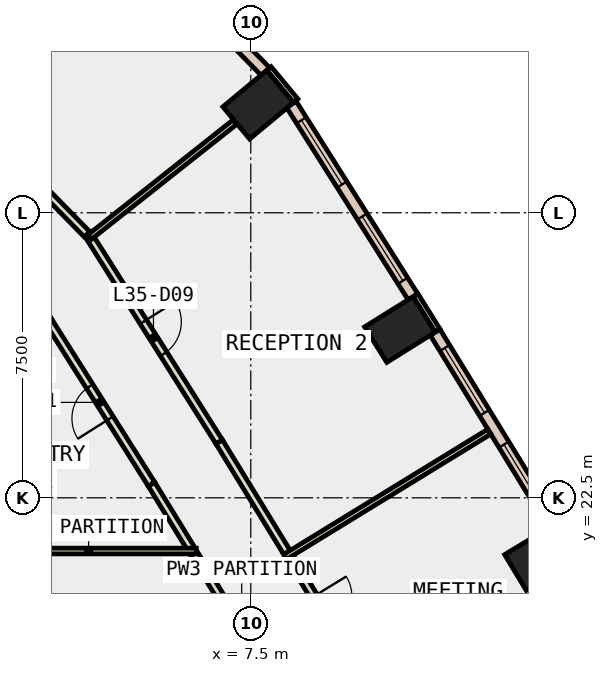
"""IFC4 building model, lengths in metres.
Left out: names, types, materials, properties, quantities, classifications, styles, units other than length and angle.
Written with IfcOpenShell. Run it as: python <this file> out.ifc"""

import sys

from ifc_helpers import new_model, si_unit, direction, frame, frame_2d, origin, origin_2d, place, context, subcontext, project, spatial, rectangle, extrude, element, fill, save


model = new_model("IFC4")
c1 = context("Model", 3, precision=1e-05, world=origin(), true_north=direction((0.0, 1.0)))
c2 = subcontext(c1, "Body", "Model", "MODEL_VIEW")
j1 = project(units=[si_unit("LENGTHUNIT", "METRE"), si_unit("PLANEANGLEUNIT", "RADIAN")], contexts=[c1])
p1 = place(None, origin())
s1 = spatial("IfcSite", under=j1, at=p1, CompositionType="ELEMENT")
p2 = place(p1, origin())
s2 = spatial("IfcBuilding", under=s1, at=p2, CompositionType="ELEMENT")
p3 = place(p2, frame((0.0, 0.0, 159.2)))
s3 = spatial("IfcBuildingStorey", under=s2, at=p3, CompositionType="ELEMENT", Elevation=159.2)
for number, where, z_axis, x_axis in (
    (1, (15.107, 20.923, -0.4), (0.0, 0.0, 1.0), (-0.518, 0.855, 0.0)),
    (2, (11.425, 26.928, -0.4), (0.0, 0.0, 1.0), (-0.53, 0.848, 0.0)),
    (3, (7.695, 32.845, -0.4), (0.0, 0.0, 1.0), (-0.639, 0.769, 0.0)),
):
    element("IfcColumn", number, at=place(p3, frame(where, z_axis=z_axis, x_axis=x_axis)), inside=s3, PredefinedType="COLUMN", context=c2, shape_type="SweptSolid", body=[
        extrude(rectangle(XDim=1.1, YDim=1.5, at=origin_2d()), origin(), (0.0, 0.0, 1.0), 4.2),
    ])
p4 = place(p3, frame((12.416, 26.899, 0.0), z_axis=(0.0, 0.0, 1.0), x_axis=(-0.529879262372, 0.848073090782, 0.0)))
e4 = element("IfcWall", 4, at=p4, inside=s3, PredefinedType="STANDARD", context=c2, shape_type="SweptSolid", body=[
    extrude(rectangle(XDim=1.1, YDim=0.15, at=frame_2d((0.55, 0.0))), origin(), (0.0, 0.0, 1.0), 3.8),
])
p5 = place(p3, frame((8.681, 32.949, 0.0), z_axis=(0.0, 0.0, 1.0), x_axis=(-0.639070205934, 0.769148406933, 0.0)))
e5 = element("IfcWall", 5, at=p5, inside=s3, PredefinedType="STANDARD", context=c2, shape_type="SweptSolid", body=[
    extrude(rectangle(XDim=1.1, YDim=0.15, at=frame_2d((0.55, 0.0))), origin(), (0.0, 0.0, 1.0), 3.8),
])
p6 = place(p3, frame((15.462, 21.779, 0.0), z_axis=(0.0, 0.0, 1.0), x_axis=(-0.522704272908, 0.852514072074, 0.0)))
e6 = element("IfcWall", 6, at=p6, inside=s3, PredefinedType="STANDARD", context=c2, shape_type="SweptSolid", body=[
    extrude(rectangle(XDim=5.958, YDim=0.3, at=frame_2d((2.979, 0.0))), origin(), (0.0, 0.0, 1.0), 3.8),
])
p7 = place(p6, frame((0.489, 0.0, 0.9)))
e7 = element("IfcOpeningElement", 7, at=p7, cuts=e6, PredefinedType="OPENING", context=c2, shape_type="SweptSolid", body=[
    extrude(rectangle(XDim=2.0, YDim=2.6, at=frame_2d((1.0, 1.3))), frame((0.0, 0.16, 0.0), z_axis=(0.0, -1.0, 0.0), x_axis=(1.0, 0.0, 0.0)), (0.0, 0.0, 1.0), 0.32),
])
p8 = place(p6, frame((3.468, 0.0, 0.9)))
e8 = element("IfcOpeningElement", 8, at=p8, cuts=e6, PredefinedType="OPENING", context=c2, shape_type="SweptSolid", body=[
    extrude(rectangle(XDim=2.0, YDim=2.6, at=frame_2d((1.0, 1.3))), frame((0.0, 0.16, 0.0), z_axis=(0.0, -1.0, 0.0), x_axis=(1.0, 0.0, 0.0)), (0.0, 0.0, 1.0), 0.32),
])
p9 = place(p3, frame((11.767, 27.79, 0.0), z_axis=(0.0, 0.0, 1.0), x_axis=(-0.534262775953, 0.845318452556, 0.0)))
e9 = element("IfcWall", 9, at=p9, inside=s3, PredefinedType="STANDARD", context=c2, shape_type="SweptSolid", body=[
    extrude(rectangle(XDim=5.992, YDim=0.3, at=frame_2d((2.996, 0.0))), origin(), (0.0, 0.0, 1.0), 3.8),
])
p10 = place(p9, frame((0.498, 0.0, 0.9)))
e10 = element("IfcOpeningElement", 10, at=p10, cuts=e9, PredefinedType="OPENING", context=c2, shape_type="SweptSolid", body=[
    extrude(rectangle(XDim=2.0, YDim=2.6, at=frame_2d((1.0, 1.3))), frame((0.0, 0.16, 0.0), z_axis=(0.0, -1.0, 0.0), x_axis=(1.0, 0.0, 0.0)), (0.0, 0.0, 1.0), 0.32),
])
p11 = place(p9, frame((3.494, 0.0, 0.9)))
e11 = element("IfcOpeningElement", 11, at=p11, cuts=e9, PredefinedType="OPENING", context=c2, shape_type="SweptSolid", body=[
    extrude(rectangle(XDim=2.0, YDim=2.6, at=frame_2d((1.0, 1.3))), frame((0.0, 0.16, 0.0), z_axis=(0.0, -1.0, 0.0), x_axis=(1.0, 0.0, 0.0)), (0.0, 0.0, 1.0), 0.32),
])
p12 = place(p3, frame((7.885, 33.717, 0.0), z_axis=(0.0, 0.0, 1.0), x_axis=(-0.7003170466, 0.713831936973, 0.0)))
e12 = element("IfcWall", 12, at=p12, inside=s3, PredefinedType="STANDARD", context=c2, shape_type="SweptSolid", body=[
    extrude(rectangle(XDim=3.775, YDim=0.3, at=frame_2d((1.888, 0.0))), origin(), (0.0, 0.0, 1.0), 3.8),
])
p13 = place(p12, frame((1.188, 0.0, 0.9)))
e13 = element("IfcOpeningElement", 13, at=p13, cuts=e12, PredefinedType="OPENING", context=c2, shape_type="SweptSolid", body=[
    extrude(rectangle(XDim=1.4, YDim=2.6, at=frame_2d((0.7, 1.3))), frame((0.0, 0.16, 0.0), z_axis=(0.0, -1.0, 0.0), x_axis=(1.0, 0.0, 0.0)), (0.0, 0.0, 1.0), 0.32),
])
p14 = place(p3, frame((8.516, 16.942, 0.0), z_axis=(0.0, 0.0, 1.0), x_axis=(-0.522865983217, 0.852414901086, 0.0)))
e14 = element("IfcWall", 14, at=p14, inside=s3, PredefinedType="PARTITIONING", context=c2, shape_type="SweptSolid", body=[
    extrude(rectangle(XDim=4.803, YDim=0.2, at=frame_2d((2.401, 0.0))), origin(), (0.0, 0.0, 1.0), 3.8),
])
p15 = place(p14, frame((1.901, 0.0, 0.0)))
e15 = element("IfcOpeningElement", 15, at=p15, cuts=e14, PredefinedType="OPENING", context=c2, shape_type="SweptSolid", body=[
    extrude(rectangle(XDim=1.0, YDim=2.1, at=frame_2d((0.5, 1.05))), frame((0.0, 0.11, 0.0), z_axis=(0.0, -1.0, 0.0), x_axis=(1.0, 0.0, 0.0)), (0.0, 0.0, 1.0), 0.22),
])
p16 = place(p3, frame((5.927, 21.164, 0.0), z_axis=(0.0, 0.0, 1.0), x_axis=(-0.522754838565, 0.852483066552, 0.0)))
e16 = element("IfcWall", 16, at=p16, inside=s3, PredefinedType="PARTITIONING", context=c2, shape_type="SweptSolid", body=[
    extrude(rectangle(XDim=1.99, YDim=0.2, at=frame_2d((0.995, 0.0))), origin(), (0.0, 0.0, 1.0), 3.8),
])
p17 = place(p3, frame((4.887, 22.86, 0.0), z_axis=(0.0, 0.0, 1.0), x_axis=(-0.534315942524, 0.845284847589, 0.0)))
e17 = element("IfcWall", 17, at=p17, inside=s3, PredefinedType="PARTITIONING", context=c2, shape_type="SweptSolid", body=[
    extrude(rectangle(XDim=5.091, YDim=0.2, at=frame_2d((2.545, 0.0))), origin(), (0.0, 0.0, 1.0), 3.8),
])
p18 = place(p17, frame((2.045, 0.0, 0.0)))
e18 = element("IfcOpeningElement", 18, at=p18, cuts=e17, PredefinedType="OPENING", context=c2, shape_type="SweptSolid", body=[
    extrude(rectangle(XDim=1.0, YDim=2.1, at=frame_2d((0.5, 1.05))), frame((0.0, 0.11, 0.0), z_axis=(0.0, -1.0, 0.0), x_axis=(1.0, 0.0, 0.0)), (0.0, 0.0, 1.0), 0.22),
])
p19 = place(p3, frame((8.53, 20.935, 0.0), z_axis=(0.0, 0.0, 1.0), x_axis=(0.522830634433, -0.852436582801, 0.0)))
e19 = element("IfcWall", 19, at=p19, inside=s3, PredefinedType="PARTITIONING", context=c2, shape_type="SweptSolid", body=[
    extrude(rectangle(XDim=3.41, YDim=0.2, at=frame_2d((1.705, 0.0))), origin(), (0.0, 0.0, 1.0), 3.8),
])
p20 = place(p19, frame((1.205, 0.0, 0.0)))
e20 = element("IfcOpeningElement", 20, at=p20, cuts=e19, PredefinedType="OPENING", context=c2, shape_type="SweptSolid", body=[
    extrude(rectangle(XDim=1.0, YDim=2.1, at=frame_2d((0.5, 1.05))), frame((0.0, 0.11, 0.0), z_axis=(0.0, -1.0, 0.0), x_axis=(1.0, 0.0, 0.0)), (0.0, 0.0, 1.0), 0.22),
])
p21 = place(p3, frame((3.209, 29.446, 0.0), z_axis=(0.0, 0.0, 1.0), x_axis=(0.534253865926, -0.845324083854, 0.0)))
e21 = element("IfcWall", 21, at=p21, inside=s3, PredefinedType="PARTITIONING", context=c2, shape_type="SweptSolid", body=[
    extrude(rectangle(XDim=6.478, YDim=0.2, at=frame_2d((3.239, 0.0))), origin(), (0.0, 0.0, 1.0), 3.8),
])
p22 = place(p21, frame((2.739, 0.0, 0.0)))
e22 = element("IfcOpeningElement", 22, at=p22, cuts=e21, PredefinedType="OPENING", context=c2, shape_type="SweptSolid", body=[
    extrude(rectangle(XDim=1.0, YDim=2.1, at=frame_2d((0.5, 1.05))), frame((0.0, 0.11, 0.0), z_axis=(0.0, -1.0, 0.0), x_axis=(1.0, 0.0, 0.0)), (0.0, 0.0, 1.0), 0.22),
])
p23 = place(p3, frame((6.67, 23.97, 0.0), z_axis=(0.0, 0.0, 1.0), x_axis=(0.522622501212, -0.85256420358, 0.0)))
e23 = element("IfcWall", 23, at=p23, inside=s3, PredefinedType="PARTITIONING", context=c2, shape_type="SweptSolid", body=[
    extrude(rectangle(XDim=3.41, YDim=0.2, at=frame_2d((1.705, 0.0))), origin(), (0.0, 0.0, 1.0), 3.8),
])
p24 = place(p3, frame((1.431, 31.228, 0.0), z_axis=(0.0, 0.0, 1.0), x_axis=(0.700326668838, -0.713822496783, 0.0)))
e24 = element("IfcWall", 24, at=p24, inside=s3, PredefinedType="PARTITIONING", context=c2, shape_type="SweptSolid", body=[
    extrude(rectangle(XDim=2.514, YDim=0.2, at=frame_2d((1.257, 0.0))), origin(), (0.0, 0.0, 1.0), 3.8),
])
p25 = place(p3, frame((0.4, 21.1, 0.0), z_axis=(0.0, 0.0, 1.0), x_axis=(1.0, 0.0, 0.0)))
e25 = element("IfcWall", 25, at=p25, inside=s3, PredefinedType="PARTITIONING", context=c2, shape_type="SweptSolid", body=[
    extrude(rectangle(XDim=5.666, YDim=0.15, at=frame_2d((2.833, 0.0))), origin(), (0.0, 0.0, 1.0), 3.8),
])
p26 = place(p3, frame((8.406, 20.947, 0.0), z_axis=(0.0, 0.0, 1.0), x_axis=(0.852529956042, 0.522678365777, 0.0)))
e26 = element("IfcWall", 26, at=p26, inside=s3, PredefinedType="PARTITIONING", context=c2, shape_type="SweptSolid", body=[
    extrude(rectangle(XDim=6.3, YDim=0.15, at=frame_2d((3.15, 0.0))), origin(), (0.0, 0.0, 1.0), 3.8),
])
p27 = place(p3, frame((3.262, 29.362, 0.0), z_axis=(0.0, 0.0, 1.0), x_axis=(0.78403972141, 0.620710653406, 0.0)))
e27 = element("IfcWall", 27, at=p27, inside=s3, PredefinedType="PARTITIONING", context=c2, shape_type="SweptSolid", body=[
    extrude(rectangle(XDim=4.867, YDim=0.15, at=frame_2d((2.434, 0.0))), origin(), (0.0, 0.0, 1.0), 3.8),
])
p28 = place(p7, origin())
e28 = element("IfcWindow", 28, at=p28, inside=s3, PartitioningType="SINGLE_PANEL", PredefinedType="WINDOW", context=c2, shape_type="SweptSolid", body=[
    extrude(rectangle(XDim=2.0, YDim=2.6, at=frame_2d((1.0, 1.3))), frame((0.0, 0.03, 0.0), z_axis=(0.0, -1.0, 0.0), x_axis=(1.0, 0.0, 0.0)), (0.0, 0.0, 1.0), 0.06),
])
fill(e7, e28)
p29 = place(p8, origin())
e29 = element("IfcWindow", 29, at=p29, inside=s3, PartitioningType="SINGLE_PANEL", PredefinedType="WINDOW", context=c2, shape_type="SweptSolid", body=[
    extrude(rectangle(XDim=2.0, YDim=2.6, at=frame_2d((1.0, 1.3))), frame((0.0, 0.03, 0.0), z_axis=(0.0, -1.0, 0.0), x_axis=(1.0, 0.0, 0.0)), (0.0, 0.0, 1.0), 0.06),
])
fill(e8, e29)
p30 = place(p10, origin())
e30 = element("IfcWindow", 30, at=p30, inside=s3, PartitioningType="SINGLE_PANEL", PredefinedType="WINDOW", context=c2, shape_type="SweptSolid", body=[
    extrude(rectangle(XDim=2.0, YDim=2.6, at=frame_2d((1.0, 1.3))), frame((0.0, 0.03, 0.0), z_axis=(0.0, -1.0, 0.0), x_axis=(1.0, 0.0, 0.0)), (0.0, 0.0, 1.0), 0.06),
])
fill(e10, e30)
p31 = place(p11, origin())
e31 = element("IfcWindow", 31, at=p31, inside=s3, PartitioningType="SINGLE_PANEL", PredefinedType="WINDOW", context=c2, shape_type="SweptSolid", body=[
    extrude(rectangle(XDim=2.0, YDim=2.6, at=frame_2d((1.0, 1.3))), frame((0.0, 0.03, 0.0), z_axis=(0.0, -1.0, 0.0), x_axis=(1.0, 0.0, 0.0)), (0.0, 0.0, 1.0), 0.06),
])
fill(e11, e31)
p32 = place(p22, origin())
e32 = element("IfcDoor", 32, at=p32, inside=s3, OperationType="SINGLE_SWING_LEFT", PredefinedType="DOOR", context=c2, shape_type="SweptSolid", body=[
    extrude(rectangle(XDim=1.0, YDim=2.1, at=frame_2d((0.5, 1.05))), frame((0.0, 0.025, 0.0), z_axis=(0.0, -1.0, 0.0), x_axis=(1.0, 0.0, 0.0)), (0.0, 0.0, 1.0), 0.05),
])
fill(e22, e32)
p33 = place(p18, origin())
e33 = element("IfcDoor", 33, at=p33, inside=s3, OperationType="SINGLE_SWING_LEFT", PredefinedType="DOOR", context=c2, shape_type="SweptSolid", body=[
    extrude(rectangle(XDim=1.0, YDim=2.1, at=frame_2d((0.5, 1.05))), frame((0.0, 0.025, 0.0), z_axis=(0.0, -1.0, 0.0), x_axis=(1.0, 0.0, 0.0)), (0.0, 0.0, 1.0), 0.05),
])
fill(e18, e33)
save(model, sys.argv[1])
